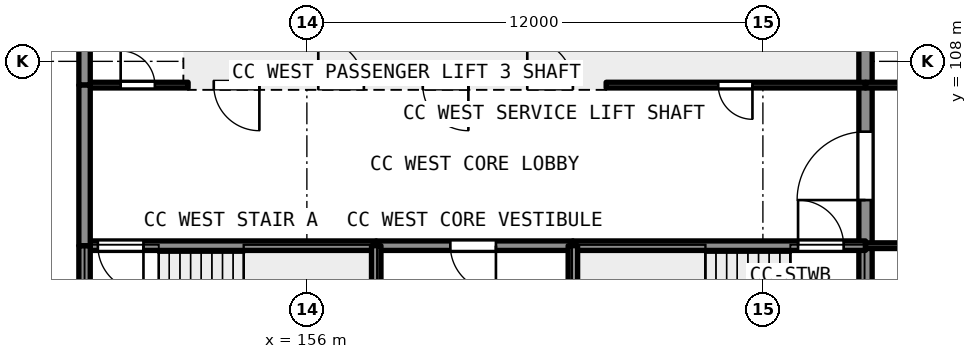
"""IFC4 building model, lengths in metres.
Left out: names, types, materials, properties, quantities, classifications, styles, units other than length and angle.
Written with IfcOpenShell. Run it as: python <this file> out.ifc"""

import sys

from ifc_helpers import new_model, si_unit, direction, frame, frame_2d, origin, place, context, subcontext, project, spatial, rectangle, extrude, element, fill, save


model = new_model("IFC4")
c1 = context("Model", 3, precision=1e-05, world=origin(), true_north=direction((0.0, 1.0)))
c2 = subcontext(c1, "Body", "Model", "MODEL_VIEW")
j1 = project(units=[si_unit("LENGTHUNIT", "METRE"), si_unit("PLANEANGLEUNIT", "RADIAN")], contexts=[c1])
p1 = place(None, origin())
s1 = spatial("IfcSite", under=j1, at=p1, CompositionType="ELEMENT")
p2 = place(p1, origin())
s2 = spatial("IfcBuilding", under=s1, at=p2, CompositionType="ELEMENT")
p3 = place(p2, frame((0.0, 0.0, 15.0)))
s3 = spatial("IfcBuildingStorey", under=s2, at=p3, CompositionType="ELEMENT", Elevation=15.0)
p4 = place(p3, frame((170.7, 100.0, 0.0), z_axis=(0.0, 0.0, 1.0), x_axis=(0.0, 1.0, 0.0)))
e1 = element("IfcWall", 1, at=p4, inside=s3, PredefinedType="SHEAR", context=c2, shape_type="SweptSolid", body=[
    extrude(rectangle(XDim=3.15, YDim=0.35, at=frame_2d((1.575, 0.0))), origin(), (0.0, 0.0, 1.0), 4.99),
])
p5 = place(p3, frame((170.7, 103.15, 0.0), z_axis=(0.0, 0.0, 1.0), x_axis=(0.0, 1.0, 0.0)))
e2 = element("IfcWall", 2, at=p5, inside=s3, PredefinedType="SHEAR", context=c2, shape_type="SweptSolid", body=[
    extrude(rectangle(XDim=7.25, YDim=0.35, at=frame_2d((3.625, 0.0))), origin(), (0.0, 0.0, 1.0), 4.99),
])
p6 = place(p5, frame((1.2, 0.0, 0.0)))
e3 = element("IfcOpeningElement", 3, at=p6, cuts=e2, PredefinedType="OPENING", context=c2, shape_type="SweptSolid", body=[
    extrude(rectangle(XDim=1.8, YDim=2.1, at=frame_2d((0.9, 1.05))), frame((0.0, 0.186, 0.0), z_axis=(0.0, -1.0, 0.0), x_axis=(1.0, 0.0, 0.0)), (0.0, 0.0, 1.0), 0.371),
])
p7 = place(p3, frame((150.3, 103.15, 0.0), z_axis=(0.0, 0.0, 1.0), x_axis=(1.0, 0.0, 0.0)))
e4 = element("IfcWall", 4, at=p7, inside=s3, PredefinedType="SHEAR", context=c2, shape_type="SweptSolid", body=[
    extrude(rectangle(XDim=7.525, YDim=0.25, at=frame_2d((3.762, 0.0))), origin(), (0.0, 0.0, 1.0), 4.99),
])
p8 = place(p7, frame((0.2, 0.0, 0.0)))
e5 = element("IfcOpeningElement", 5, at=p8, cuts=e4, PredefinedType="OPENING", context=c2, shape_type="SweptSolid", body=[
    extrude(rectangle(XDim=1.2, YDim=2.1, at=frame_2d((0.6, 1.05))), frame((0.0, 0.135, 0.0), z_axis=(0.0, -1.0, 0.0), x_axis=(1.0, 0.0, 0.0)), (0.0, 0.0, 1.0), 0.271),
])
p9 = place(p3, frame((157.825, 103.15, 0.0), z_axis=(0.0, 0.0, 1.0), x_axis=(1.0, 0.0, 0.0)))
e6 = element("IfcWall", 6, at=p9, inside=s3, PredefinedType="SHEAR", context=c2, shape_type="SweptSolid", body=[
    extrude(rectangle(XDim=5.175, YDim=0.25, at=frame_2d((2.587, 0.0))), origin(), (0.0, 0.0, 1.0), 4.99),
])
p10 = place(p9, frame((1.95, 0.0, 0.0)))
e7 = element("IfcOpeningElement", 7, at=p10, cuts=e6, PredefinedType="OPENING", context=c2, shape_type="SweptSolid", body=[
    extrude(rectangle(XDim=1.2, YDim=2.1, at=frame_2d((0.6, 1.05))), frame((0.0, 0.135, 0.0), z_axis=(0.0, -1.0, 0.0), x_axis=(1.0, 0.0, 0.0)), (0.0, 0.0, 1.0), 0.271),
])
p11 = place(p3, frame((163.0, 103.15, 0.0), z_axis=(0.0, 0.0, 1.0), x_axis=(1.0, 0.0, 0.0)))
e8 = element("IfcWall", 8, at=p11, inside=s3, PredefinedType="SHEAR", context=c2, shape_type="SweptSolid", body=[
    extrude(rectangle(XDim=7.7, YDim=0.25, at=frame_2d((3.85, 0.0))), origin(), (0.0, 0.0, 1.0), 4.99),
])
p12 = place(p11, frame((5.925, 0.0, 0.0)))
e9 = element("IfcOpeningElement", 9, at=p12, cuts=e8, PredefinedType="OPENING", context=c2, shape_type="SweptSolid", body=[
    extrude(rectangle(XDim=1.2, YDim=2.1, at=frame_2d((0.6, 1.05))), frame((0.0, 0.135, 0.0), z_axis=(0.0, -1.0, 0.0), x_axis=(1.0, 0.0, 0.0)), (0.0, 0.0, 1.0), 0.271),
])
for number, where, z_axis, x_axis in (
    (10, (157.825, 100.0, 0.0), (0.0, 0.0, 1.0), (0.0, 1.0, 0.0)),
    (11, (163.0, 100.0, 0.0), (0.0, 0.0, 1.0), (0.0, 1.0, 0.0)),
):
    element("IfcWall", number, at=place(p3, frame(where, z_axis=z_axis, x_axis=x_axis)), inside=s3, PredefinedType="SHEAR", context=c2, shape_type="SweptSolid", body=[
        extrude(rectangle(XDim=3.15, YDim=0.25, at=frame_2d((1.575, 0.0))), origin(), (0.0, 0.0, 1.0), 4.99),
    ])
p13 = place(p2, origin())
s4 = spatial("IfcBuildingStorey", under=s2, at=p13, CompositionType="ELEMENT", Elevation=0.0)
for number, where, z_axis, x_axis in (
    (12, (152.875, 107.375, -1.2), (0.0, 0.0, 1.0), (0.0, 1.0, 0.0)),
    (13, (155.625, 107.375, -1.2), (0.0, 0.0, 1.0), (0.0, 1.0, 0.0)),
    (14, (158.375, 107.375, -1.2), (0.0, 0.0, 1.0), (0.0, 1.0, 0.0)),
    (15, (161.125, 107.375, -1.2), (0.0, 0.0, 1.0), (0.0, 1.0, 0.0)),
    (16, (163.875, 107.375, -1.2), (0.0, 0.0, 1.0), (0.0, 1.0, 0.0)),
):
    element("IfcWall", number, at=place(p13, frame(where, z_axis=z_axis, x_axis=x_axis)), inside=s4, PredefinedType="SHEAR", context=c2, shape_type="SweptSolid", body=[
        extrude(rectangle(XDim=3.025, YDim=0.25, at=frame_2d((1.512, 0.0))), origin(), (0.0, 0.0, 1.0), 30.79),
    ])
p14 = place(p13, frame((163.875, 107.375, -1.2), z_axis=(0.0, 0.0, 1.0), x_axis=(-1.0, 0.0, 0.0)))
e17 = element("IfcWall", 17, at=p14, inside=s4, PredefinedType="SHEAR", context=c2, shape_type="SweptSolid", body=[
    extrude(rectangle(XDim=11.0, YDim=0.25, at=frame_2d((5.5, 0.0))), origin(), (0.0, 0.0, 1.0), 30.79),
])
p15 = place(p14, frame((9.125, 0.0, 1.2)))
e18 = element("IfcOpeningElement", 18, at=p15, cuts=e17, PredefinedType="OPENING", context=c2, shape_type="SweptSolid", body=[
    extrude(rectangle(XDim=1.2, YDim=2.1, at=frame_2d((0.6, 1.05))), frame((0.0, 0.135, 0.0), z_axis=(0.0, -1.0, 0.0), x_axis=(1.0, 0.0, 0.0)), (0.0, 0.0, 1.0), 0.271),
])
p16 = place(p14, frame((6.375, 0.0, 1.2)))
e19 = element("IfcOpeningElement", 19, at=p16, cuts=e17, PredefinedType="OPENING", context=c2, shape_type="SweptSolid", body=[
    extrude(rectangle(XDim=1.2, YDim=2.1, at=frame_2d((0.6, 1.05))), frame((0.0, 0.135, 0.0), z_axis=(0.0, -1.0, 0.0), x_axis=(1.0, 0.0, 0.0)), (0.0, 0.0, 1.0), 0.271),
])
p17 = place(p14, frame((3.625, 0.0, 1.2)))
e20 = element("IfcOpeningElement", 20, at=p17, cuts=e17, PredefinedType="OPENING", context=c2, shape_type="SweptSolid", body=[
    extrude(rectangle(XDim=1.2, YDim=2.1, at=frame_2d((0.6, 1.05))), frame((0.0, 0.135, 0.0), z_axis=(0.0, -1.0, 0.0), x_axis=(1.0, 0.0, 0.0)), (0.0, 0.0, 1.0), 0.271),
])
p18 = place(p14, frame((0.875, 0.0, 1.2)))
e21 = element("IfcOpeningElement", 21, at=p18, cuts=e17, PredefinedType="OPENING", context=c2, shape_type="SweptSolid", body=[
    extrude(rectangle(XDim=1.2, YDim=2.1, at=frame_2d((0.6, 1.05))), frame((0.0, 0.135, 0.0), z_axis=(0.0, -1.0, 0.0), x_axis=(1.0, 0.0, 0.0)), (0.0, 0.0, 1.0), 0.271),
])
p19 = place(p14, frame((9.125, 0.0, 10.2)))
e22 = element("IfcOpeningElement", 22, at=p19, cuts=e17, PredefinedType="OPENING", context=c2, shape_type="SweptSolid", body=[
    extrude(rectangle(XDim=1.2, YDim=2.1, at=frame_2d((0.6, 1.05))), frame((0.0, 0.135, 0.0), z_axis=(0.0, -1.0, 0.0), x_axis=(1.0, 0.0, 0.0)), (0.0, 0.0, 1.0), 0.271),
])
p20 = place(p14, frame((6.375, 0.0, 10.2)))
e23 = element("IfcOpeningElement", 23, at=p20, cuts=e17, PredefinedType="OPENING", context=c2, shape_type="SweptSolid", body=[
    extrude(rectangle(XDim=1.2, YDim=2.1, at=frame_2d((0.6, 1.05))), frame((0.0, 0.135, 0.0), z_axis=(0.0, -1.0, 0.0), x_axis=(1.0, 0.0, 0.0)), (0.0, 0.0, 1.0), 0.271),
])
p21 = place(p14, frame((3.625, 0.0, 10.2)))
e24 = element("IfcOpeningElement", 24, at=p21, cuts=e17, PredefinedType="OPENING", context=c2, shape_type="SweptSolid", body=[
    extrude(rectangle(XDim=1.2, YDim=2.1, at=frame_2d((0.6, 1.05))), frame((0.0, 0.135, 0.0), z_axis=(0.0, -1.0, 0.0), x_axis=(1.0, 0.0, 0.0)), (0.0, 0.0, 1.0), 0.271),
])
p22 = place(p14, frame((0.875, 0.0, 10.2)))
e25 = element("IfcOpeningElement", 25, at=p22, cuts=e17, PredefinedType="OPENING", context=c2, shape_type="SweptSolid", body=[
    extrude(rectangle(XDim=1.2, YDim=2.1, at=frame_2d((0.6, 1.05))), frame((0.0, 0.135, 0.0), z_axis=(0.0, -1.0, 0.0), x_axis=(1.0, 0.0, 0.0)), (0.0, 0.0, 1.0), 0.271),
])
p23 = place(p14, frame((9.125, 0.0, 16.2)))
e26 = element("IfcOpeningElement", 26, at=p23, cuts=e17, PredefinedType="OPENING", context=c2, shape_type="SweptSolid", body=[
    extrude(rectangle(XDim=1.2, YDim=2.1, at=frame_2d((0.6, 1.05))), frame((0.0, 0.135, 0.0), z_axis=(0.0, -1.0, 0.0), x_axis=(1.0, 0.0, 0.0)), (0.0, 0.0, 1.0), 0.271),
])
p24 = place(p14, frame((6.375, 0.0, 16.2)))
e27 = element("IfcOpeningElement", 27, at=p24, cuts=e17, PredefinedType="OPENING", context=c2, shape_type="SweptSolid", body=[
    extrude(rectangle(XDim=1.2, YDim=2.1, at=frame_2d((0.6, 1.05))), frame((0.0, 0.135, 0.0), z_axis=(0.0, -1.0, 0.0), x_axis=(1.0, 0.0, 0.0)), (0.0, 0.0, 1.0), 0.271),
])
p25 = place(p14, frame((3.625, 0.0, 16.2)))
e28 = element("IfcOpeningElement", 28, at=p25, cuts=e17, PredefinedType="OPENING", context=c2, shape_type="SweptSolid", body=[
    extrude(rectangle(XDim=1.2, YDim=2.1, at=frame_2d((0.6, 1.05))), frame((0.0, 0.135, 0.0), z_axis=(0.0, -1.0, 0.0), x_axis=(1.0, 0.0, 0.0)), (0.0, 0.0, 1.0), 0.271),
])
p26 = place(p14, frame((0.875, 0.0, 16.2)))
e29 = element("IfcOpeningElement", 29, at=p26, cuts=e17, PredefinedType="OPENING", context=c2, shape_type="SweptSolid", body=[
    extrude(rectangle(XDim=1.2, YDim=2.1, at=frame_2d((0.6, 1.05))), frame((0.0, 0.135, 0.0), z_axis=(0.0, -1.0, 0.0), x_axis=(1.0, 0.0, 0.0)), (0.0, 0.0, 1.0), 0.271),
])
p27 = place(p14, frame((9.125, 0.0, 21.6)))
e30 = element("IfcOpeningElement", 30, at=p27, cuts=e17, PredefinedType="OPENING", context=c2, shape_type="SweptSolid", body=[
    extrude(rectangle(XDim=1.2, YDim=2.1, at=frame_2d((0.6, 1.05))), frame((0.0, 0.135, 0.0), z_axis=(0.0, -1.0, 0.0), x_axis=(1.0, 0.0, 0.0)), (0.0, 0.0, 1.0), 0.271),
])
p28 = place(p14, frame((6.375, 0.0, 21.6)))
e31 = element("IfcOpeningElement", 31, at=p28, cuts=e17, PredefinedType="OPENING", context=c2, shape_type="SweptSolid", body=[
    extrude(rectangle(XDim=1.2, YDim=2.1, at=frame_2d((0.6, 1.05))), frame((0.0, 0.135, 0.0), z_axis=(0.0, -1.0, 0.0), x_axis=(1.0, 0.0, 0.0)), (0.0, 0.0, 1.0), 0.271),
])
p29 = place(p14, frame((3.625, 0.0, 21.6)))
e32 = element("IfcOpeningElement", 32, at=p29, cuts=e17, PredefinedType="OPENING", context=c2, shape_type="SweptSolid", body=[
    extrude(rectangle(XDim=1.2, YDim=2.1, at=frame_2d((0.6, 1.05))), frame((0.0, 0.135, 0.0), z_axis=(0.0, -1.0, 0.0), x_axis=(1.0, 0.0, 0.0)), (0.0, 0.0, 1.0), 0.271),
])
p30 = place(p14, frame((0.875, 0.0, 21.6)))
e33 = element("IfcOpeningElement", 33, at=p30, cuts=e17, PredefinedType="OPENING", context=c2, shape_type="SweptSolid", body=[
    extrude(rectangle(XDim=1.2, YDim=2.1, at=frame_2d((0.6, 1.05))), frame((0.0, 0.135, 0.0), z_axis=(0.0, -1.0, 0.0), x_axis=(1.0, 0.0, 0.0)), (0.0, 0.0, 1.0), 0.271),
])
p31 = place(p14, frame((9.125, 0.0, 26.6)))
e34 = element("IfcOpeningElement", 34, at=p31, cuts=e17, PredefinedType="OPENING", context=c2, shape_type="SweptSolid", body=[
    extrude(rectangle(XDim=1.2, YDim=2.1, at=frame_2d((0.6, 1.05))), frame((0.0, 0.135, 0.0), z_axis=(0.0, -1.0, 0.0), x_axis=(1.0, 0.0, 0.0)), (0.0, 0.0, 1.0), 0.271),
])
p32 = place(p14, frame((6.375, 0.0, 26.6)))
e35 = element("IfcOpeningElement", 35, at=p32, cuts=e17, PredefinedType="OPENING", context=c2, shape_type="SweptSolid", body=[
    extrude(rectangle(XDim=1.2, YDim=2.1, at=frame_2d((0.6, 1.05))), frame((0.0, 0.135, 0.0), z_axis=(0.0, -1.0, 0.0), x_axis=(1.0, 0.0, 0.0)), (0.0, 0.0, 1.0), 0.271),
])
p33 = place(p14, frame((3.625, 0.0, 26.6)))
e36 = element("IfcOpeningElement", 36, at=p33, cuts=e17, PredefinedType="OPENING", context=c2, shape_type="SweptSolid", body=[
    extrude(rectangle(XDim=1.2, YDim=2.1, at=frame_2d((0.6, 1.05))), frame((0.0, 0.135, 0.0), z_axis=(0.0, -1.0, 0.0), x_axis=(1.0, 0.0, 0.0)), (0.0, 0.0, 1.0), 0.271),
])
p34 = place(p14, frame((0.875, 0.0, 26.6)))
e37 = element("IfcOpeningElement", 37, at=p34, cuts=e17, PredefinedType="OPENING", context=c2, shape_type="SweptSolid", body=[
    extrude(rectangle(XDim=1.2, YDim=2.1, at=frame_2d((0.6, 1.05))), frame((0.0, 0.135, 0.0), z_axis=(0.0, -1.0, 0.0), x_axis=(1.0, 0.0, 0.0)), (0.0, 0.0, 1.0), 0.271),
])
p35 = place(p3, frame((150.3, 107.375, 0.0), z_axis=(0.0, 0.0, 1.0), x_axis=(1.0, 0.0, 0.0)))
e38 = element("IfcWall", 38, at=p35, inside=s3, PredefinedType="PARTITIONING", context=c2, shape_type="SweptSolid", body=[
    extrude(rectangle(XDim=2.575, YDim=0.15, at=frame_2d((1.288, 0.0))), origin(), (0.0, 0.0, 1.0), 4.99),
])
p36 = place(p35, frame((0.8, 0.0, 0.0)))
e39 = element("IfcOpeningElement", 39, at=p36, cuts=e38, PredefinedType="OPENING", context=c2, shape_type="SweptSolid", body=[
    extrude(rectangle(XDim=0.9, YDim=2.1, at=frame_2d((0.45, 1.05))), frame((0.0, 0.085, 0.0), z_axis=(0.0, -1.0, 0.0), x_axis=(1.0, 0.0, 0.0)), (0.0, 0.0, 1.0), 0.171),
])
p37 = place(p3, frame((150.15, 107.375, 0.0), z_axis=(0.0, 0.0, 1.0), x_axis=(0.0, 1.0, 0.0)))
e40 = element("IfcWall", 40, at=p37, inside=s3, PredefinedType="SOLIDWALL", context=c2, shape_type="SweptSolid", body=[
    extrude(rectangle(XDim=3.175, YDim=0.3, at=frame_2d((1.587, 0.0))), origin(), (0.0, 0.0, 1.0), 4.99),
])
p38 = place(p3, frame((163.875, 107.375, 0.0), z_axis=(0.0, 0.0, 1.0), x_axis=(1.0, 0.0, 0.0)))
e41 = element("IfcWall", 41, at=p38, inside=s3, PredefinedType="PARTITIONING", context=c2, shape_type="SweptSolid", body=[
    extrude(rectangle(XDim=6.825, YDim=0.15, at=frame_2d((3.413, 0.0))), origin(), (0.0, 0.0, 1.0), 4.99),
])
p39 = place(p38, frame((2.95, 0.0, 0.0)))
e42 = element("IfcOpeningElement", 42, at=p39, cuts=e41, PredefinedType="OPENING", context=c2, shape_type="SweptSolid", body=[
    extrude(rectangle(XDim=0.9, YDim=2.1, at=frame_2d((0.45, 1.05))), frame((0.0, 0.085, 0.0), z_axis=(0.0, -1.0, 0.0), x_axis=(1.0, 0.0, 0.0)), (0.0, 0.0, 1.0), 0.171),
])
p40 = place(p3, frame((150.15, 100.0, 0.0), z_axis=(0.0, 0.0, 1.0), x_axis=(0.0, 1.0, 0.0)))
e43 = element("IfcWall", 43, at=p40, inside=s3, PredefinedType="SOLIDWALL", context=c2, shape_type="SweptSolid", body=[
    extrude(rectangle(XDim=3.15, YDim=0.3, at=frame_2d((1.575, 0.0))), origin(), (0.0, 0.0, 1.0), 4.99),
])
p41 = place(p3, frame((150.15, 103.15, 0.0), z_axis=(0.0, 0.0, 1.0), x_axis=(0.0, 1.0, 0.0)))
e44 = element("IfcWall", 44, at=p41, inside=s3, PredefinedType="SOLIDWALL", context=c2, shape_type="SweptSolid", body=[
    extrude(rectangle(XDim=4.225, YDim=0.3, at=frame_2d((2.113, 0.0))), origin(), (0.0, 0.0, 1.0), 4.99),
])
p42 = place(p3, frame((170.7, 103.15, 0.0), z_axis=(0.0, 0.0, 1.0), x_axis=(1.0, 0.0, 0.0)))
e45 = element("IfcWall", 45, at=p42, inside=s3, PredefinedType="PARTITIONING", context=c2, shape_type="SweptSolid", body=[
    extrude(rectangle(XDim=10.85, YDim=0.15, at=frame_2d((5.425, 0.0))), origin(), (0.0, 0.0, 1.0), 4.99),
])
p43 = place(p42, frame((4.95, 0.0, 0.0)))
e46 = element("IfcOpeningElement", 46, at=p43, cuts=e45, PredefinedType="OPENING", context=c2, shape_type="SweptSolid", body=[
    extrude(rectangle(XDim=1.0, YDim=2.1, at=frame_2d((0.5, 1.05))), frame((0.0, 0.085, 0.0), z_axis=(0.0, -1.0, 0.0), x_axis=(1.0, 0.0, 0.0)), (0.0, 0.0, 1.0), 0.171),
])
p44 = place(p3, frame((209.0, 107.375, 0.0), z_axis=(0.0, 0.0, 1.0), x_axis=(-1.0, 0.0, 0.0)))
e47 = element("IfcWall", 47, at=p44, inside=s3, PredefinedType="PARTITIONING", context=c2, shape_type="SweptSolid", body=[
    extrude(rectangle(XDim=38.3, YDim=0.15, at=frame_2d((19.15, 0.0))), origin(), (0.0, 0.0, 1.0), 4.99),
])
p45 = place(p44, frame((32.85, 0.0, 0.0)))
e48 = element("IfcOpeningElement", 48, at=p45, cuts=e47, PredefinedType="OPENING", context=c2, shape_type="SweptSolid", body=[
    extrude(rectangle(XDim=1.0, YDim=2.1, at=frame_2d((0.5, 1.05))), frame((0.0, 0.085, 0.0), z_axis=(0.0, -1.0, 0.0), x_axis=(1.0, 0.0, 0.0)), (0.0, 0.0, 1.0), 0.171),
])
p46 = place(p44, frame((22.85, 0.0, 0.0)))
e49 = element("IfcOpeningElement", 49, at=p46, cuts=e47, PredefinedType="OPENING", context=c2, shape_type="SweptSolid", body=[
    extrude(rectangle(XDim=1.0, YDim=2.1, at=frame_2d((0.5, 1.05))), frame((0.0, 0.085, 0.0), z_axis=(0.0, -1.0, 0.0), x_axis=(1.0, 0.0, 0.0)), (0.0, 0.0, 1.0), 0.171),
])
p47 = place(p44, frame((13.35, 0.0, 0.0)))
e50 = element("IfcOpeningElement", 50, at=p47, cuts=e47, PredefinedType="OPENING", context=c2, shape_type="SweptSolid", body=[
    extrude(rectangle(XDim=1.0, YDim=2.1, at=frame_2d((0.5, 1.05))), frame((0.0, 0.085, 0.0), z_axis=(0.0, -1.0, 0.0), x_axis=(1.0, 0.0, 0.0)), (0.0, 0.0, 1.0), 0.171),
])
p48 = place(p44, frame((3.95, 0.0, 0.0)))
e51 = element("IfcOpeningElement", 51, at=p48, cuts=e47, PredefinedType="OPENING", context=c2, shape_type="SweptSolid", body=[
    extrude(rectangle(XDim=1.0, YDim=2.1, at=frame_2d((0.5, 1.05))), frame((0.0, 0.085, 0.0), z_axis=(0.0, -1.0, 0.0), x_axis=(1.0, 0.0, 0.0)), (0.0, 0.0, 1.0), 0.171),
])
p49 = place(p6, origin())
e52 = element("IfcDoor", 52, at=p49, inside=s3, OperationType="DOUBLE_DOOR_SINGLE_SWING", PredefinedType="DOOR", context=c2, shape_type="SweptSolid", body=[
    extrude(rectangle(XDim=1.8, YDim=2.1, at=frame_2d((0.9, 1.05))), frame((0.0, 0.025, 0.0), z_axis=(0.0, -1.0, 0.0), x_axis=(1.0, 0.0, 0.0)), (0.0, 0.0, 1.0), 0.05),
])
fill(e3, e52)
p50 = place(p8, origin())
e53 = element("IfcDoor", 53, at=p50, inside=s3, OperationType="SINGLE_SWING_RIGHT", PredefinedType="DOOR", context=c2, shape_type="SweptSolid", body=[
    extrude(rectangle(XDim=1.2, YDim=2.1, at=frame_2d((0.6, 1.05))), frame((0.0, 0.025, 0.0), z_axis=(0.0, -1.0, 0.0), x_axis=(1.0, 0.0, 0.0)), (0.0, 0.0, 1.0), 0.05),
])
fill(e5, e53)
p51 = place(p12, origin())
e54 = element("IfcDoor", 54, at=p51, inside=s3, OperationType="SINGLE_SWING_LEFT", PredefinedType="DOOR", context=c2, shape_type="SweptSolid", body=[
    extrude(rectangle(XDim=1.2, YDim=2.1, at=frame_2d((0.6, 1.05))), frame((0.0, 0.025, 0.0), z_axis=(0.0, -1.0, 0.0), x_axis=(1.0, 0.0, 0.0)), (0.0, 0.0, 1.0), 0.05),
])
fill(e9, e54)
p52 = place(p10, origin())
e55 = element("IfcDoor", 55, at=p52, inside=s3, OperationType="SINGLE_SWING_RIGHT", PredefinedType="DOOR", context=c2, shape_type="SweptSolid", body=[
    extrude(rectangle(XDim=1.2, YDim=2.1, at=frame_2d((0.6, 1.05))), frame((0.0, 0.025, 0.0), z_axis=(0.0, -1.0, 0.0), x_axis=(1.0, 0.0, 0.0)), (0.0, 0.0, 1.0), 0.05),
])
fill(e7, e55)
p53 = place(p23, origin())
e56 = element("IfcDoor", 56, at=p53, inside=s3, OperationType="SLIDING_TO_LEFT", PredefinedType="DOOR", context=c2, shape_type="SweptSolid", body=[
    extrude(rectangle(XDim=1.2, YDim=2.1, at=frame_2d((0.6, 1.05))), frame((0.0, 0.025, 0.0), z_axis=(0.0, -1.0, 0.0), x_axis=(1.0, 0.0, 0.0)), (0.0, 0.0, 1.0), 0.05),
])
fill(e26, e56)
p54 = place(p24, origin())
e57 = element("IfcDoor", 57, at=p54, inside=s3, OperationType="SLIDING_TO_RIGHT", PredefinedType="DOOR", context=c2, shape_type="SweptSolid", body=[
    extrude(rectangle(XDim=1.2, YDim=2.1, at=frame_2d((0.6, 1.05))), frame((0.0, 0.025, 0.0), z_axis=(0.0, -1.0, 0.0), x_axis=(1.0, 0.0, 0.0)), (0.0, 0.0, 1.0), 0.05),
])
fill(e27, e57)
p55 = place(p25, origin())
e58 = element("IfcDoor", 58, at=p55, inside=s3, OperationType="SLIDING_TO_LEFT", PredefinedType="DOOR", context=c2, shape_type="SweptSolid", body=[
    extrude(rectangle(XDim=1.2, YDim=2.1, at=frame_2d((0.6, 1.05))), frame((0.0, 0.025, 0.0), z_axis=(0.0, -1.0, 0.0), x_axis=(1.0, 0.0, 0.0)), (0.0, 0.0, 1.0), 0.05),
])
fill(e28, e58)
p56 = place(p26, origin())
e59 = element("IfcDoor", 59, at=p56, inside=s3, OperationType="SLIDING_TO_RIGHT", PredefinedType="DOOR", context=c2, shape_type="SweptSolid", body=[
    extrude(rectangle(XDim=1.2, YDim=2.1, at=frame_2d((0.6, 1.05))), frame((0.0, 0.025, 0.0), z_axis=(0.0, -1.0, 0.0), x_axis=(1.0, 0.0, 0.0)), (0.0, 0.0, 1.0), 0.05),
])
fill(e29, e59)
p57 = place(p36, origin())
e60 = element("IfcDoor", 60, at=p57, inside=s3, OperationType="SINGLE_SWING_LEFT", PredefinedType="DOOR", context=c2, shape_type="SweptSolid", body=[
    extrude(rectangle(XDim=0.9, YDim=2.1, at=frame_2d((0.45, 1.05))), frame((0.0, 0.025, 0.0), z_axis=(0.0, -1.0, 0.0), x_axis=(1.0, 0.0, 0.0)), (0.0, 0.0, 1.0), 0.05),
])
fill(e39, e60)
p58 = place(p39, origin())
e61 = element("IfcDoor", 61, at=p58, inside=s3, OperationType="SINGLE_SWING_RIGHT", PredefinedType="DOOR", context=c2, shape_type="SweptSolid", body=[
    extrude(rectangle(XDim=0.9, YDim=2.1, at=frame_2d((0.45, 1.05))), frame((0.0, 0.025, 0.0), z_axis=(0.0, -1.0, 0.0), x_axis=(1.0, 0.0, 0.0)), (0.0, 0.0, 1.0), 0.05),
])
fill(e42, e61)
save(model, sys.argv[1])
